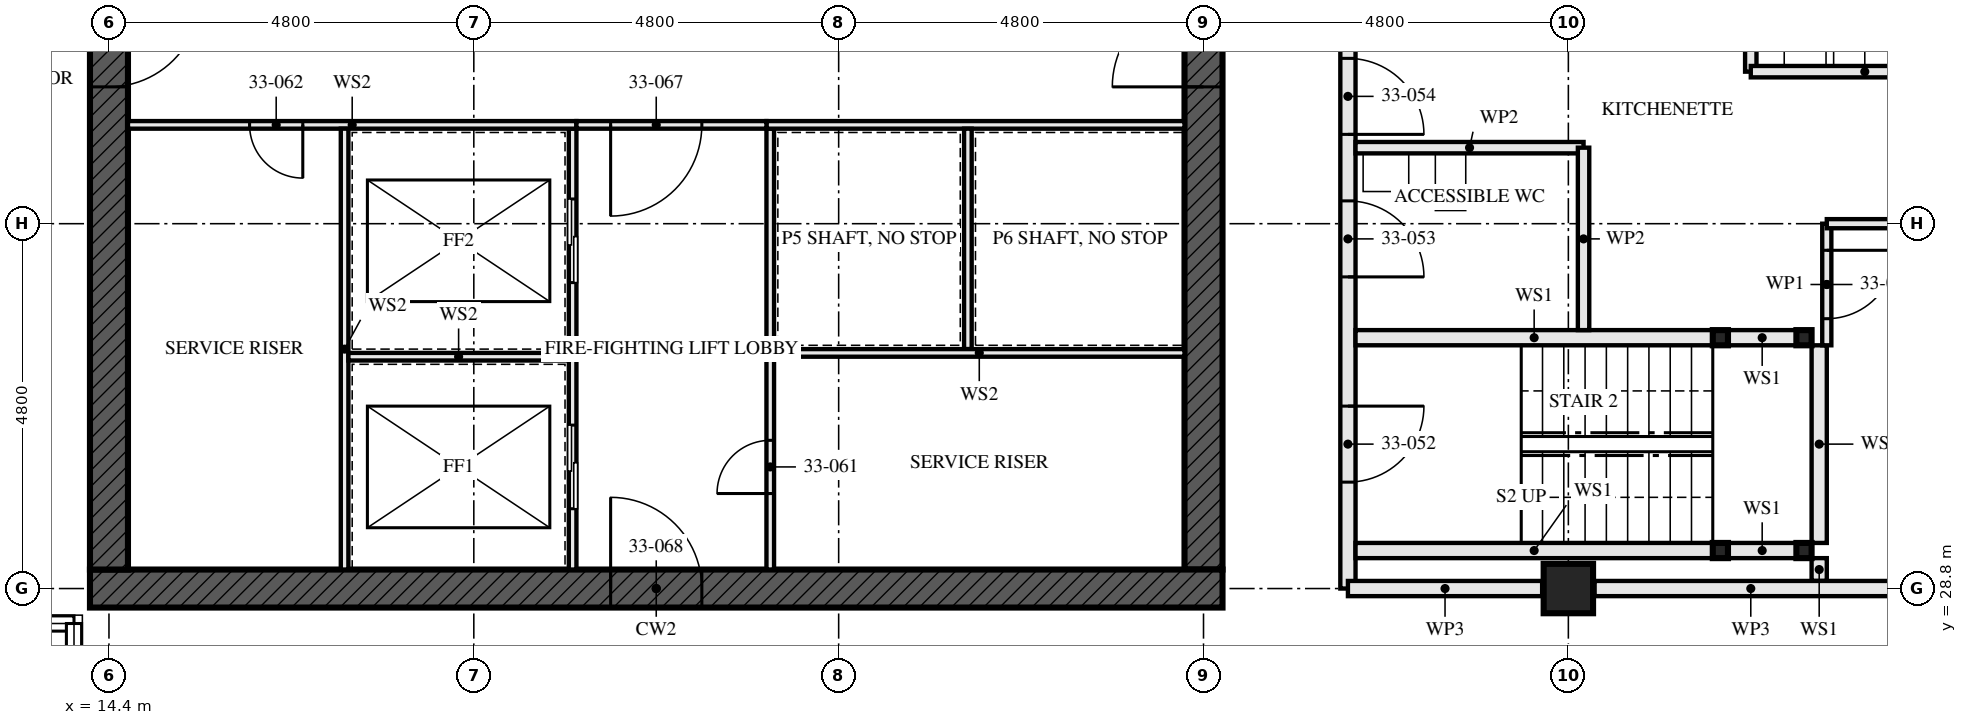
"""IFC4 building model, lengths in metres.
Left out: names, types, materials, properties, quantities, classifications, styles, units other than length and angle.
Written with IfcOpenShell. Run it as: python <this file> out.ifc"""

import sys

from ifc_helpers import new_model, si_unit, direction, frame, frame_2d, origin, origin_2d, place, context, subcontext, project, spatial, rectangle, hollow_rectangle, extrude, element, fill, save


model = new_model("IFC4")
c1 = context("Model", 3, precision=1e-05, world=origin(), true_north=direction((0.0, 1.0)))
c2 = subcontext(c1, "Body", "Model", "MODEL_VIEW")
j1 = project(units=[si_unit("LENGTHUNIT", "METRE"), si_unit("PLANEANGLEUNIT", "RADIAN")], contexts=[c1])
p1 = place(None, origin())
s1 = spatial("IfcSite", under=j1, at=p1, CompositionType="ELEMENT")
p2 = place(p1, origin())
s2 = spatial("IfcBuilding", under=s1, at=p2, CompositionType="ELEMENT")
p3 = place(p2, frame((0.0, 0.0, 122.5)))
s3 = spatial("IfcBuildingStorey", under=s2, at=p3, CompositionType="ELEMENT", Elevation=122.5)
p4 = place(p3, frame((33.6, 28.8, 0.0), z_axis=(0.0, 0.0, 1.0), x_axis=(0.0, 1.0, 0.0)))
e1 = element("IfcColumn", 1, at=p4, inside=s3, PredefinedType="COLUMN", context=c2, shape_type="SweptSolid", body=[
    extrude(hollow_rectangle(XDim=0.65, YDim=0.65, WallThickness=0.05, at=origin_2d()), origin(), (0.0, 0.0, 1.0), 3.5),
])
p5 = place(p3, frame((14.15, 28.8, -0.17), z_axis=(0.0, 0.0, 1.0), x_axis=(1.0, 0.0, 0.0)))
e2 = element("IfcWall", 2, at=p5, inside=s3, PredefinedType="SHEAR", context=c2, shape_type="SweptSolid", body=[
    extrude(rectangle(XDim=14.9, YDim=0.5, at=frame_2d((7.45, 0.0))), origin(), (0.0, 0.0, 1.0), 3.5),
])
p6 = place(p5, frame((6.85, 0.0, 0.17)))
e3 = element("IfcOpeningElement", 3, at=p6, cuts=e2, PredefinedType="OPENING", context=c2, shape_type="SweptSolid", body=[
    extrude(rectangle(XDim=1.2, YDim=2.1, at=frame_2d((0.6, 1.05))), frame((0.0, 0.26, 0.0), z_axis=(0.0, -1.0, 0.0), x_axis=(1.0, 0.0, 0.0)), (0.0, 0.0, 1.0), 0.521),
])
p7 = place(p3, frame((14.4, 42.95, -0.17), z_axis=(0.0, 0.0, 1.0), x_axis=(0.0, -1.0, 0.0)))
e4 = element("IfcWall", 4, at=p7, inside=s3, PredefinedType="SHEAR", context=c2, shape_type="SweptSolid", body=[
    extrude(rectangle(XDim=13.9, YDim=0.5, at=frame_2d((6.95, 0.0))), origin(), (0.0, 0.0, 1.0), 3.5),
])
p8 = place(p7, frame((6.35, 0.0, 0.17)))
e5 = element("IfcOpeningElement", 5, at=p8, cuts=e4, PredefinedType="OPENING", context=c2, shape_type="SweptSolid", body=[
    extrude(rectangle(XDim=1.2, YDim=2.1, at=frame_2d((0.6, 1.05))), frame((0.0, 0.26, 0.0), z_axis=(0.0, -1.0, 0.0), x_axis=(1.0, 0.0, 0.0)), (0.0, 0.0, 1.0), 0.521),
])
p9 = place(p3, frame((28.8, 29.05, -0.17), z_axis=(0.0, 0.0, 1.0), x_axis=(0.0, 1.0, 0.0)))
e6 = element("IfcWall", 6, at=p9, inside=s3, PredefinedType="SHEAR", context=c2, shape_type="SweptSolid", body=[
    extrude(rectangle(XDim=13.9, YDim=0.5, at=frame_2d((6.95, 0.0))), origin(), (0.0, 0.0, 1.0), 3.5),
])
p10 = place(p9, frame((6.35, 0.0, 0.17)))
e7 = element("IfcOpeningElement", 7, at=p10, cuts=e6, PredefinedType="OPENING", context=c2, shape_type="SweptSolid", body=[
    extrude(rectangle(XDim=1.2, YDim=2.1, at=frame_2d((0.6, 1.05))), frame((0.0, 0.26, 0.0), z_axis=(0.0, -1.0, 0.0), x_axis=(1.0, 0.0, 0.0)), (0.0, 0.0, 1.0), 0.521),
])
for number, where, z_axis, x_axis in (
    (8, (36.7, 29.3, 0.0), (0.0, 0.0, 1.0), (1.0, 0.0, 0.0)),
    (9, (36.7, 32.1, 0.0), (0.0, 0.0, 1.0), (1.0, 0.0, 0.0)),
    (10, (35.6, 29.3, 0.0), (0.0, 0.0, 1.0), (1.0, 0.0, 0.0)),
    (11, (35.6, 32.1, 0.0), (0.0, 0.0, 1.0), (1.0, 0.0, 0.0)),
):
    element("IfcColumn", number, at=place(p3, frame(where, z_axis=z_axis, x_axis=x_axis)), inside=s3, PredefinedType="COLUMN", context=c2, shape_type="SweptSolid", body=[
        extrude(hollow_rectangle(XDim=0.2, YDim=0.2, WallThickness=0.008, at=origin_2d()), origin(), (0.0, 0.0, 1.0), 3.33),
    ])
p11 = place(p3, frame((36.6, 29.3, 0.0), z_axis=(0.0, 0.0, 1.0), x_axis=(-1.0, 0.0, 0.0)))
e12 = element("IfcWall", 12, at=p11, inside=s3, PredefinedType="SOLIDWALL", context=c2, shape_type="SweptSolid", body=[
    extrude(rectangle(XDim=0.9, YDim=0.2, at=frame_2d((0.45, 0.0))), origin(), (0.0, 0.0, 1.0), 2.99),
])
p12 = place(p3, frame((35.5, 29.3, 0.0), z_axis=(0.0, 0.0, 1.0), x_axis=(-1.0, 0.0, 0.0)))
e13 = element("IfcWall", 13, at=p12, inside=s3, PredefinedType="SOLIDWALL", context=c2, shape_type="SweptSolid", body=[
    extrude(rectangle(XDim=4.7, YDim=0.2, at=frame_2d((2.35, 0.0))), origin(), (0.0, 0.0, 1.0), 2.99),
])
p13 = place(p3, frame((36.6, 32.1, 0.0), z_axis=(0.0, 0.0, 1.0), x_axis=(-1.0, 0.0, 0.0)))
e14 = element("IfcWall", 14, at=p13, inside=s3, PredefinedType="SOLIDWALL", context=c2, shape_type="SweptSolid", body=[
    extrude(rectangle(XDim=0.9, YDim=0.2, at=frame_2d((0.45, 0.0))), origin(), (0.0, 0.0, 1.0), 2.99),
])
p14 = place(p3, frame((35.5, 32.1, 0.0), z_axis=(0.0, 0.0, 1.0), x_axis=(-1.0, 0.0, 0.0)))
e15 = element("IfcWall", 15, at=p14, inside=s3, PredefinedType="SOLIDWALL", context=c2, shape_type="SweptSolid", body=[
    extrude(rectangle(XDim=4.7, YDim=0.2, at=frame_2d((2.35, 0.0))), origin(), (0.0, 0.0, 1.0), 2.99),
])
p15 = place(p3, frame((36.9, 28.9, 0.0), z_axis=(0.0, 0.0, 1.0), x_axis=(0.0, 1.0, 0.0)))
e16 = element("IfcWall", 16, at=p15, inside=s3, PredefinedType="SOLIDWALL", context=c2, shape_type="SweptSolid", body=[
    extrude(rectangle(XDim=0.3, YDim=0.2, at=frame_2d((0.15, 0.0))), origin(), (0.0, 0.0, 1.0), 3.33),
])
p16 = place(p3, frame((36.9, 29.4, 0.0), z_axis=(0.0, 0.0, 1.0), x_axis=(0.0, 1.0, 0.0)))
e17 = element("IfcWall", 17, at=p16, inside=s3, PredefinedType="SOLIDWALL", context=c2, shape_type="SweptSolid", body=[
    extrude(rectangle(XDim=2.6, YDim=0.2, at=frame_2d((1.3, 0.0))), origin(), (0.0, 0.0, 1.0), 3.33),
])
p17 = place(p3, frame((33.8, 32.2, 0.0), z_axis=(0.0, 0.0, 1.0), x_axis=(0.0, 1.0, 0.0)))
e18 = element("IfcWall", 18, at=p17, inside=s3, PredefinedType="PARTITIONING", context=c2, shape_type="SweptSolid", body=[
    extrude(rectangle(XDim=2.4, YDim=0.15, at=frame_2d((1.2, 0.0))), origin(), (0.0, 0.0, 1.0), 2.55),
])
for number, where, z_axis, x_axis in (
    (19, (33.8, 34.6, 0.0), (0.0, 0.0, 1.0), (-1.0, 0.0, 0.0)),
    (20, (39.0, 35.6, 0.0), (0.0, 0.0, 1.0), (-1.0, 0.0, 0.0)),
):
    element("IfcWall", number, at=place(p3, frame(where, z_axis=z_axis, x_axis=x_axis)), inside=s3, PredefinedType="PARTITIONING", context=c2, shape_type="SweptSolid", body=[
        extrude(rectangle(XDim=3.0, YDim=0.15, at=frame_2d((1.5, 0.0))), origin(), (0.0, 0.0, 1.0), 3.33),
    ])
p18 = place(p3, frame((36.0, 35.6, 0.0), z_axis=(0.0, 0.0, 1.0), x_axis=(0.0, 1.0, 0.0)))
e21 = element("IfcWall", 21, at=p18, inside=s3, PredefinedType="PARTITIONING", context=c2, shape_type="SweptSolid", body=[
    extrude(rectangle(XDim=2.8, YDim=0.15, at=frame_2d((1.4, 0.0))), origin(), (0.0, 0.0, 1.0), 3.33),
])
p19 = place(p3, frame((37.0, 32.0, 0.0), z_axis=(0.0, 0.0, 1.0), x_axis=(0.0, 1.0, 0.0)))
e22 = element("IfcWall", 22, at=p19, inside=s3, PredefinedType="PARTITIONING", context=c2, shape_type="SweptSolid", body=[
    extrude(rectangle(XDim=1.6, YDim=0.12, at=frame_2d((0.8, 0.0))), origin(), (0.0, 0.0, 1.0), 3.33),
])
p20 = place(p19, frame((0.35, 0.0, 0.0)))
e23 = element("IfcOpeningElement", 23, at=p20, cuts=e22, PredefinedType="OPENING", context=c2, shape_type="SweptSolid", body=[
    extrude(rectangle(XDim=0.9, YDim=2.1, at=frame_2d((0.45, 1.05))), frame((0.0, 0.071, 0.0), z_axis=(0.0, -1.0, 0.0), x_axis=(1.0, 0.0, 0.0)), (0.0, 0.0, 1.0), 0.141),
])
p21 = place(p3, frame((42.88, 33.6, 0.0), z_axis=(0.0, 0.0, 1.0), x_axis=(-1.0, 0.0, 0.0)))
e24 = element("IfcWall", 24, at=p21, inside=s3, PredefinedType="PARTITIONING", context=c2, shape_type="SweptSolid", body=[
    extrude(rectangle(XDim=5.88, YDim=0.12, at=frame_2d((2.94, 0.0))), origin(), (0.0, 0.0, 1.0), 2.55),
])
p22 = place(p3, frame((30.7, 28.8, 0.0), z_axis=(0.0, 0.0, 1.0), x_axis=(0.0, 1.0, 0.0)))
e25 = element("IfcWall", 25, at=p22, inside=s3, PredefinedType="PARTITIONING", context=c2, shape_type="SweptSolid", body=[
    extrude(rectangle(XDim=14.84, YDim=0.2, at=frame_2d((7.42, 0.0))), origin(), (0.0, 0.0, 1.0), 2.32),
])
p23 = place(p22, frame((1.4, 0.0, 0.0)))
e26 = element("IfcOpeningElement", 26, at=p23, cuts=e25, PredefinedType="OPENING", context=c2, shape_type="SweptSolid", body=[
    extrude(rectangle(XDim=1.0, YDim=2.1, at=frame_2d((0.5, 1.05))), frame((0.0, 0.111, 0.0), z_axis=(0.0, -1.0, 0.0), x_axis=(1.0, 0.0, 0.0)), (0.0, 0.0, 1.0), 0.221),
])
p24 = place(p22, frame((4.1, 0.0, 0.0)))
e27 = element("IfcOpeningElement", 27, at=p24, cuts=e25, PredefinedType="OPENING", context=c2, shape_type="SweptSolid", body=[
    extrude(rectangle(XDim=1.0, YDim=2.1, at=frame_2d((0.5, 1.05))), frame((0.0, 0.111, 0.0), z_axis=(0.0, -1.0, 0.0), x_axis=(1.0, 0.0, 0.0)), (0.0, 0.0, 1.0), 0.221),
])
p25 = place(p22, frame((5.975, 0.0, 0.0)))
e28 = element("IfcOpeningElement", 28, at=p25, cuts=e25, PredefinedType="OPENING", context=c2, shape_type="SweptSolid", body=[
    extrude(rectangle(XDim=1.0, YDim=2.1, at=frame_2d((0.5, 1.05))), frame((0.0, 0.111, 0.0), z_axis=(0.0, -1.0, 0.0), x_axis=(1.0, 0.0, 0.0)), (0.0, 0.0, 1.0), 0.221),
])
p26 = place(p22, frame((13.0, 0.0, 0.0)))
e29 = element("IfcOpeningElement", 29, at=p26, cuts=e25, PredefinedType="OPENING", context=c2, shape_type="SweptSolid", body=[
    extrude(rectangle(XDim=1.0, YDim=2.1, at=frame_2d((0.5, 1.05))), frame((0.0, 0.111, 0.0), z_axis=(0.0, -1.0, 0.0), x_axis=(1.0, 0.0, 0.0)), (0.0, 0.0, 1.0), 0.221),
])
p27 = place(p3, frame((20.5, 29.05, 0.0), z_axis=(0.0, 0.0, 1.0), x_axis=(0.0, 1.0, 0.0)))
e30 = element("IfcWall", 30, at=p27, inside=s3, PredefinedType="SOLIDWALL", context=c2, shape_type="SweptSolid", body=[
    extrude(rectangle(XDim=5.8, YDim=0.1, at=frame_2d((2.9, 0.0))), origin(), (0.0, 0.0, 1.0), 3.33),
])
p28 = place(p27, frame((0.8, 0.0, 0.0)))
e31 = element("IfcOpeningElement", 31, at=p28, cuts=e30, PredefinedType="OPENING", context=c2, shape_type="SweptSolid", body=[
    extrude(rectangle(XDim=1.1, YDim=2.3, at=frame_2d((0.55, 1.15))), frame((0.0, 0.061, 0.0), z_axis=(0.0, -1.0, 0.0), x_axis=(1.0, 0.0, 0.0)), (0.0, 0.0, 1.0), 0.121),
])
p29 = place(p27, frame((3.775, 0.0, 0.0)))
e32 = element("IfcOpeningElement", 32, at=p29, cuts=e30, PredefinedType="OPENING", context=c2, shape_type="SweptSolid", body=[
    extrude(rectangle(XDim=1.1, YDim=2.3, at=frame_2d((0.55, 1.15))), frame((0.0, 0.061, 0.0), z_axis=(0.0, -1.0, 0.0), x_axis=(1.0, 0.0, 0.0)), (0.0, 0.0, 1.0), 0.121),
])
p30 = place(p3, frame((23.1, 29.05, 0.0), z_axis=(0.0, 0.0, 1.0), x_axis=(0.0, 1.0, 0.0)))
e33 = element("IfcWall", 33, at=p30, inside=s3, PredefinedType="SOLIDWALL", context=c2, shape_type="SweptSolid", body=[
    extrude(rectangle(XDim=5.8, YDim=0.1, at=frame_2d((2.9, 0.0))), origin(), (0.0, 0.0, 1.0), 3.33),
])
p31 = place(p30, frame((1.0, 0.0, 0.0)))
e34 = element("IfcOpeningElement", 34, at=p31, cuts=e33, PredefinedType="OPENING", context=c2, shape_type="SweptSolid", body=[
    extrude(rectangle(XDim=0.7, YDim=2.1, at=frame_2d((0.35, 1.05))), frame((0.0, 0.061, 0.0), z_axis=(0.0, -1.0, 0.0), x_axis=(1.0, 0.0, 0.0)), (0.0, 0.0, 1.0), 0.121),
])
p32 = place(p3, frame((14.65, 34.9, 0.0), z_axis=(0.0, 0.0, 1.0), x_axis=(1.0, 0.0, 0.0)))
e35 = element("IfcWall", 35, at=p32, inside=s3, PredefinedType="SOLIDWALL", context=c2, shape_type="SweptSolid", body=[
    extrude(rectangle(XDim=5.9, YDim=0.1, at=frame_2d((2.95, 0.0))), origin(), (0.0, 0.0, 1.0), 3.33),
])
p33 = place(p32, frame((1.6, 0.0, 0.0)))
e36 = element("IfcOpeningElement", 36, at=p33, cuts=e35, PredefinedType="OPENING", context=c2, shape_type="SweptSolid", body=[
    extrude(rectangle(XDim=0.7, YDim=2.1, at=frame_2d((0.35, 1.05))), frame((0.0, 0.061, 0.0), z_axis=(0.0, -1.0, 0.0), x_axis=(1.0, 0.0, 0.0)), (0.0, 0.0, 1.0), 0.121),
])
p34 = place(p3, frame((23.05, 34.9, 0.0), z_axis=(0.0, 0.0, 1.0), x_axis=(1.0, 0.0, 0.0)))
e37 = element("IfcWall", 37, at=p34, inside=s3, PredefinedType="SOLIDWALL", context=c2, shape_type="SweptSolid", body=[
    extrude(rectangle(XDim=5.5, YDim=0.1, at=frame_2d((2.75, 0.0))), origin(), (0.0, 0.0, 1.0), 3.33),
])
p35 = place(p3, frame((20.55, 34.9, 0.0), z_axis=(0.0, 0.0, 1.0), x_axis=(1.0, 0.0, 0.0)))
e38 = element("IfcWall", 38, at=p35, inside=s3, PredefinedType="SOLIDWALL", context=c2, shape_type="SweptSolid", body=[
    extrude(rectangle(XDim=2.5, YDim=0.1, at=frame_2d((1.25, 0.0))), origin(), (0.0, 0.0, 1.0), 3.33),
])
p36 = place(p35, frame((0.45, 0.0, 0.0)))
e39 = element("IfcOpeningElement", 39, at=p36, cuts=e38, PredefinedType="OPENING", context=c2, shape_type="SweptSolid", body=[
    extrude(rectangle(XDim=1.2, YDim=2.1, at=frame_2d((0.6, 1.05))), frame((0.0, 0.061, 0.0), z_axis=(0.0, -1.0, 0.0), x_axis=(1.0, 0.0, 0.0)), (0.0, 0.0, 1.0), 0.121),
])
p37 = place(p3, frame((17.5, 29.05, 0.0), z_axis=(0.0, 0.0, 1.0), x_axis=(0.0, 1.0, 0.0)))
e40 = element("IfcWall", 40, at=p37, inside=s3, PredefinedType="SOLIDWALL", context=c2, shape_type="SweptSolid", body=[
    extrude(rectangle(XDim=5.8, YDim=0.1, at=frame_2d((2.9, 0.0))), origin(), (0.0, 0.0, 1.0), 3.33),
])
p38 = place(p3, frame((17.55, 31.85, 0.0), z_axis=(0.0, 0.0, 1.0), x_axis=(1.0, 0.0, 0.0)))
e41 = element("IfcWall", 41, at=p38, inside=s3, PredefinedType="SOLIDWALL", context=c2, shape_type="SweptSolid", body=[
    extrude(rectangle(XDim=2.9, YDim=0.1, at=frame_2d((1.45, 0.0))), origin(), (0.0, 0.0, 1.0), 3.33),
])
p39 = place(p3, frame((25.7, 31.95, 0.0), z_axis=(0.0, 0.0, 1.0), x_axis=(0.0, 1.0, 0.0)))
e42 = element("IfcWall", 42, at=p39, inside=s3, PredefinedType="SOLIDWALL", context=c2, shape_type="SweptSolid", body=[
    extrude(rectangle(XDim=2.9, YDim=0.1, at=frame_2d((1.45, 0.0))), origin(), (0.0, 0.0, 1.0), 3.33),
])
p40 = place(p3, frame((23.15, 31.9, 0.0), z_axis=(0.0, 0.0, 1.0), x_axis=(1.0, 0.0, 0.0)))
e43 = element("IfcWall", 43, at=p40, inside=s3, PredefinedType="SOLIDWALL", context=c2, shape_type="SweptSolid", body=[
    extrude(rectangle(XDim=5.4, YDim=0.1, at=frame_2d((2.7, 0.0))), origin(), (0.0, 0.0, 1.0), 3.33),
])
p41 = place(p3, frame((38.055, 28.8, 0.0), z_axis=(0.0, 0.0, 1.0), x_axis=(-1.0, 0.0, 0.0)))
e44 = element("IfcWall", 44, at=p41, inside=s3, PredefinedType="PARTITIONING", context=c2, shape_type="SweptSolid", body=[
    extrude(rectangle(XDim=4.11, YDim=0.2, at=frame_2d((2.055, 0.0))), origin(), (0.0, 0.0, 1.0), 2.32),
])
p42 = place(p3, frame((33.255, 28.8, 0.0), z_axis=(0.0, 0.0, 1.0), x_axis=(-1.0, 0.0, 0.0)))
e45 = element("IfcWall", 45, at=p42, inside=s3, PredefinedType="PARTITIONING", context=c2, shape_type="SweptSolid", body=[
    extrude(rectangle(XDim=2.555, YDim=0.2, at=frame_2d((1.277, 0.0))), origin(), (0.0, 0.0, 1.0), 2.32),
])
p43 = place(p20, frame((0.9, 0.0, 0.0), z_axis=(0.0, 0.0, 1.0), x_axis=(-1.0, 0.0, 0.0)))
e46 = element("IfcDoor", 46, at=p43, inside=s3, OperationType="SINGLE_SWING_RIGHT", PredefinedType="DOOR", context=c2, shape_type="SweptSolid", body=[
    extrude(rectangle(XDim=0.9, YDim=2.1, at=frame_2d((0.45, 1.05))), frame((0.0, 0.022, 0.0), z_axis=(0.0, -1.0, 0.0), x_axis=(1.0, 0.0, 0.0)), (0.0, 0.0, 1.0), 0.044),
])
fill(e23, e46)
p44 = place(p23, frame((1.0, 0.0, 0.0), z_axis=(0.0, 0.0, 1.0), x_axis=(-1.0, 0.0, 0.0)))
e47 = element("IfcDoor", 47, at=p44, inside=s3, OperationType="SINGLE_SWING_RIGHT", PredefinedType="DOOR", context=c2, shape_type="SweptSolid", body=[
    extrude(rectangle(XDim=1.0, YDim=2.1, at=frame_2d((0.5, 1.05))), frame((0.0, 0.032, 0.0), z_axis=(0.0, -1.0, 0.0), x_axis=(1.0, 0.0, 0.0)), (0.0, 0.0, 1.0), 0.064),
])
fill(e26, e47)
p45 = place(p24, frame((1.0, 0.0, 0.0), z_axis=(0.0, 0.0, 1.0), x_axis=(-1.0, 0.0, 0.0)))
e48 = element("IfcDoor", 48, at=p45, inside=s3, OperationType="SINGLE_SWING_LEFT", PredefinedType="DOOR", context=c2, shape_type="SweptSolid", body=[
    extrude(rectangle(XDim=1.0, YDim=2.1, at=frame_2d((0.5, 1.05))), frame((0.0, 0.027, 0.0), z_axis=(0.0, -1.0, 0.0), x_axis=(1.0, 0.0, 0.0)), (0.0, 0.0, 1.0), 0.054),
])
fill(e27, e48)
p46 = place(p25, frame((1.0, 0.0, 0.0), z_axis=(0.0, 0.0, 1.0), x_axis=(-1.0, 0.0, 0.0)))
e49 = element("IfcDoor", 49, at=p46, inside=s3, OperationType="SINGLE_SWING_LEFT", PredefinedType="DOOR", context=c2, shape_type="SweptSolid", body=[
    extrude(rectangle(XDim=1.0, YDim=2.1, at=frame_2d((0.5, 1.05))), frame((0.0, 0.027, 0.0), z_axis=(0.0, -1.0, 0.0), x_axis=(1.0, 0.0, 0.0)), (0.0, 0.0, 1.0), 0.054),
])
fill(e28, e49)
p47 = place(p28, origin())
e50 = element("IfcDoor", 50, at=p47, inside=s3, OperationType="SLIDING_TO_LEFT", PredefinedType="DOOR", context=c2, shape_type="SweptSolid", body=[
    extrude(rectangle(XDim=1.1, YDim=2.3, at=frame_2d((0.55, 1.15))), frame((0.0, 0.05, 0.0), z_axis=(0.0, -1.0, 0.0), x_axis=(1.0, 0.0, 0.0)), (0.0, 0.0, 1.0), 0.1),
])
fill(e31, e50)
p48 = place(p29, origin())
e51 = element("IfcDoor", 51, at=p48, inside=s3, OperationType="SLIDING_TO_LEFT", PredefinedType="DOOR", context=c2, shape_type="SweptSolid", body=[
    extrude(rectangle(XDim=1.1, YDim=2.3, at=frame_2d((0.55, 1.15))), frame((0.0, 0.05, 0.0), z_axis=(0.0, -1.0, 0.0), x_axis=(1.0, 0.0, 0.0)), (0.0, 0.0, 1.0), 0.1),
])
fill(e32, e51)
p49 = place(p31, origin())
e52 = element("IfcDoor", 52, at=p49, inside=s3, OperationType="SINGLE_SWING_RIGHT", PredefinedType="DOOR", context=c2, shape_type="SweptSolid", body=[
    extrude(rectangle(XDim=0.7, YDim=2.1, at=frame_2d((0.35, 1.05))), frame((0.0, 0.027, 0.0), z_axis=(0.0, -1.0, 0.0), x_axis=(1.0, 0.0, 0.0)), (0.0, 0.0, 1.0), 0.054),
])
fill(e34, e52)
p50 = place(p33, frame((0.7, 0.0, 0.0), z_axis=(0.0, 0.0, 1.0), x_axis=(-1.0, 0.0, 0.0)))
e53 = element("IfcDoor", 53, at=p50, inside=s3, OperationType="SINGLE_SWING_RIGHT", PredefinedType="DOOR", context=c2, shape_type="SweptSolid", body=[
    extrude(rectangle(XDim=0.7, YDim=2.1, at=frame_2d((0.35, 1.05))), frame((0.0, 0.027, 0.0), z_axis=(0.0, -1.0, 0.0), x_axis=(1.0, 0.0, 0.0)), (0.0, 0.0, 1.0), 0.054),
])
fill(e36, e53)
p51 = place(p36, frame((1.2, 0.0, 0.0), z_axis=(0.0, 0.0, 1.0), x_axis=(-1.0, 0.0, 0.0)))
e54 = element("IfcDoor", 54, at=p51, inside=s3, OperationType="SINGLE_SWING_LEFT", PredefinedType="DOOR", context=c2, shape_type="SweptSolid", body=[
    extrude(rectangle(XDim=1.2, YDim=2.1, at=frame_2d((0.6, 1.05))), frame((0.0, 0.027, 0.0), z_axis=(0.0, -1.0, 0.0), x_axis=(1.0, 0.0, 0.0)), (0.0, 0.0, 1.0), 0.054),
])
fill(e39, e54)
p52 = place(p6, origin())
e55 = element("IfcDoor", 55, at=p52, inside=s3, OperationType="SINGLE_SWING_LEFT", PredefinedType="DOOR", context=c2, shape_type="SweptSolid", body=[
    extrude(rectangle(XDim=1.2, YDim=2.1, at=frame_2d((0.6, 1.05))), frame((0.0, 0.027, 0.0), z_axis=(0.0, -1.0, 0.0), x_axis=(1.0, 0.0, 0.0)), (0.0, 0.0, 1.0), 0.054),
])
fill(e3, e55)
p53 = place(p8, origin())
e56 = element("IfcDoor", 56, at=p53, inside=s3, OperationType="SINGLE_SWING_LEFT", PredefinedType="DOOR", context=c2, shape_type="SweptSolid", body=[
    extrude(rectangle(XDim=1.2, YDim=2.1, at=frame_2d((0.6, 1.05))), frame((0.0, 0.027, 0.0), z_axis=(0.0, -1.0, 0.0), x_axis=(1.0, 0.0, 0.0)), (0.0, 0.0, 1.0), 0.054),
])
fill(e5, e56)
p54 = place(p10, origin())
e57 = element("IfcDoor", 57, at=p54, inside=s3, OperationType="SINGLE_SWING_LEFT", PredefinedType="DOOR", context=c2, shape_type="SweptSolid", body=[
    extrude(rectangle(XDim=1.2, YDim=2.1, at=frame_2d((0.6, 1.05))), frame((0.0, 0.027, 0.0), z_axis=(0.0, -1.0, 0.0), x_axis=(1.0, 0.0, 0.0)), (0.0, 0.0, 1.0), 0.054),
])
fill(e7, e57)
save(model, sys.argv[1])
